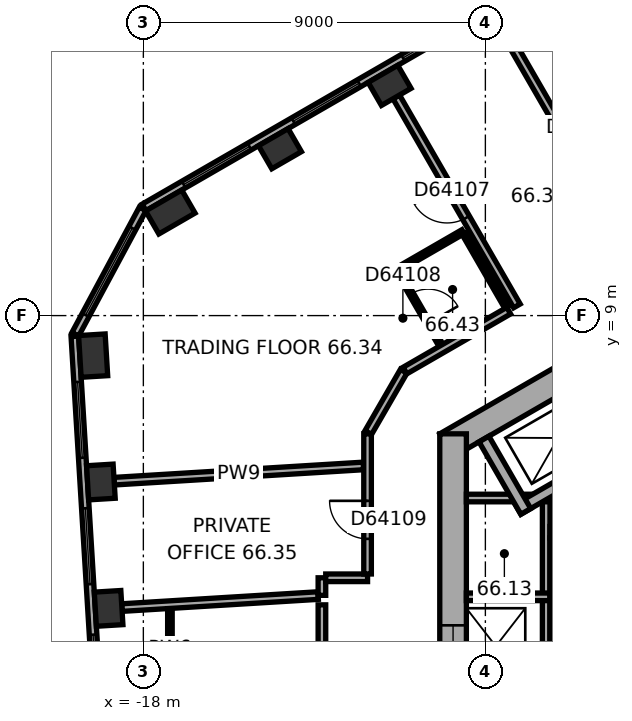
"""IFC4 building model, lengths in metres.
Left out: names, types, materials, properties, quantities, classifications, styles, units other than length and angle.
Written with IfcOpenShell. Run it as: python <this file> out.ifc"""

import sys

from ifc_helpers import new_model, si_unit, direction, frame, frame_2d, origin, origin_2d, place, context, subcontext, project, spatial, rectangle, extrude, element, fill, save


model = new_model("IFC4")
c1 = context("Model", 3, precision=1e-05, world=origin(), true_north=direction((0.0, 1.0)))
c2 = subcontext(c1, "Body", "Model", "MODEL_VIEW")
j1 = project(units=[si_unit("LENGTHUNIT", "METRE"), si_unit("PLANEANGLEUNIT", "RADIAN")], contexts=[c1])
p1 = place(None, origin())
s1 = spatial("IfcSite", under=j1, at=p1, CompositionType="ELEMENT")
p2 = place(p1, origin())
s2 = spatial("IfcBuilding", under=s1, at=p2, CompositionType="ELEMENT")
p3 = place(p2, frame((0.0, 0.0, 267.2)))
s3 = spatial("IfcBuildingStorey", under=s2, at=p3, CompositionType="ELEMENT", Elevation=267.2)
for number, where, z_axis, x_axis in (
    (1, (-11.52, 15.057, 0.0), (0.0, 0.0, 1.0), (-0.866, -0.5, 0.0)),
    (2, (-14.406, 13.391, 0.0), (0.0, 0.0, 1.0), (-0.866, -0.5, 0.0)),
):
    element("IfcColumn", number, at=place(p3, frame(where, z_axis=z_axis, x_axis=x_axis)), inside=s3, PredefinedType="COLUMN", context=c2, shape_type="SweptSolid", body=[
        extrude(rectangle(XDim=0.9, YDim=0.7, at=origin_2d()), origin(), (0.0, 0.0, 1.0), 3.7),
    ])
for number, where, z_axis, x_axis in (
    (3, (-17.291, 11.726, 0.0), (0.0, 0.0, 1.0), (-0.866, -0.5, 0.0)),
    (4, (-19.321, 7.947, 0.0), (0.0, 0.0, 1.0), (0.061, -0.998, 0.0)),
):
    element("IfcColumn", number, at=place(p3, frame(where, z_axis=z_axis, x_axis=x_axis)), inside=s3, PredefinedType="COLUMN", context=c2, shape_type="SweptSolid", body=[
        extrude(rectangle(XDim=1.1, YDim=0.7, at=origin_2d()), origin(), (0.0, 0.0, 1.0), 3.7),
    ])
for number, where, z_axis, x_axis in (
    (5, (-19.118, 4.621, 0.0), (0.0, 0.0, 1.0), (0.061, -0.998, 0.0)),
    (6, (-18.914, 1.296, 0.0), (0.0, 0.0, 1.0), (0.061, -0.998, 0.0)),
):
    element("IfcColumn", number, at=place(p3, frame(where, z_axis=z_axis, x_axis=x_axis)), inside=s3, PredefinedType="COLUMN", context=c2, shape_type="SweptSolid", body=[
        extrude(rectangle(XDim=0.9, YDim=0.7, at=origin_2d()), origin(), (0.0, 0.0, 1.0), 3.7),
    ])
p4 = place(p3, frame((0.175, 11.475, 0.0), z_axis=(0.0, 0.0, 1.0), x_axis=(-0.866026453023, -0.499998182661, 0.0)))
e7 = element("IfcWall", 7, at=p4, inside=s3, PredefinedType="SHEAR", context=c2, shape_type="SweptSolid", body=[
    extrude(rectangle(XDim=11.778, YDim=0.7, at=frame_2d((5.889, 0.0))), origin(), (0.0, 0.0, 1.0), 3.7),
])
p5 = place(p4, frame((6.089, 0.0, 0.0)))
e8 = element("IfcOpeningElement", 8, at=p5, cuts=e7, PredefinedType="OPENING", context=c2, shape_type="SweptSolid", body=[
    extrude(rectangle(XDim=1.5, YDim=2.1, at=frame_2d((0.75, 1.05))), frame((0.0, 0.36, 0.0), z_axis=(0.0, -1.0, 0.0), x_axis=(1.0, 0.0, 0.0)), (0.0, 0.0, 1.0), 0.72),
])
p6 = place(p4, frame((2.939, 0.0, 0.0)))
e9 = element("IfcOpeningElement", 9, at=p6, cuts=e7, PredefinedType="OPENING", context=c2, shape_type="SweptSolid", body=[
    extrude(rectangle(XDim=0.9, YDim=2.1, at=frame_2d((0.45, 1.05))), frame((0.0, 0.36, 0.0), z_axis=(0.0, -1.0, 0.0), x_axis=(1.0, 0.0, 0.0)), (0.0, 0.0, 1.0), 0.72),
])
p7 = place(p3, frame((-9.85, 5.889, 0.0), z_axis=(0.0, 0.0, 1.0), x_axis=(0.0, -1.0, 0.0)))
e10 = element("IfcWall", 10, at=p7, inside=s3, PredefinedType="SHEAR", context=c2, shape_type="SweptSolid", body=[
    extrude(rectangle(XDim=11.778, YDim=0.7, at=frame_2d((5.889, 0.0))), origin(), (0.0, 0.0, 1.0), 3.7),
])
p8 = place(p7, frame((5.039, 0.0, 0.0)))
e11 = element("IfcOpeningElement", 11, at=p8, cuts=e10, PredefinedType="OPENING", context=c2, shape_type="SweptSolid", body=[
    extrude(rectangle(XDim=1.1, YDim=2.1, at=frame_2d((0.55, 1.05))), frame((0.0, 0.36, 0.0), z_axis=(0.0, -1.0, 0.0), x_axis=(1.0, 0.0, 0.0)), (0.0, 0.0, 1.0), 0.72),
])
p9 = place(p7, frame((7.639, 0.0, 0.0)))
e12 = element("IfcOpeningElement", 12, at=p9, cuts=e10, PredefinedType="OPENING", context=c2, shape_type="SweptSolid", body=[
    extrude(rectangle(XDim=1.1, YDim=2.1, at=frame_2d((0.55, 1.05))), frame((0.0, 0.36, 0.0), z_axis=(0.0, -1.0, 0.0), x_axis=(1.0, 0.0, 0.0)), (0.0, 0.0, 1.0), 0.72),
])
p10 = place(p3, frame((-2.624, 20.713, 0.0), z_axis=(0.0, 0.0, 1.0), x_axis=(-0.866026460444, -0.499998169808, 0.0)))
e13 = element("IfcWall", 13, at=p10, inside=s3, PredefinedType="STANDARD", context=c2, shape_type="SweptSolid", body=[
    extrude(rectangle(XDim=17.731, YDim=0.2, at=frame_2d((8.866, 0.0))), origin(), (0.0, 0.0, 1.0), 3.7),
])
p11 = place(p10, frame((1.203, 0.0, 0.9)))
e14 = element("IfcOpeningElement", 14, at=p11, cuts=e13, PredefinedType="OPENING", context=c2, shape_type="SweptSolid", body=[
    extrude(rectangle(XDim=2.0, YDim=2.0, at=frame_2d((1.0, 1.0))), frame((0.0, 0.11, 0.0), z_axis=(0.0, -1.0, 0.0), x_axis=(1.0, 0.0, 0.0)), (0.0, 0.0, 1.0), 0.22),
])
p12 = place(p10, frame((4.535, 0.0, 0.9)))
e15 = element("IfcOpeningElement", 15, at=p12, cuts=e13, PredefinedType="OPENING", context=c2, shape_type="SweptSolid", body=[
    extrude(rectangle(XDim=2.0, YDim=2.0, at=frame_2d((1.0, 1.0))), frame((0.0, 0.11, 0.0), z_axis=(0.0, -1.0, 0.0), x_axis=(1.0, 0.0, 0.0)), (0.0, 0.0, 1.0), 0.22),
])
p13 = place(p10, frame((7.867, 0.0, 0.9)))
e16 = element("IfcOpeningElement", 16, at=p13, cuts=e13, PredefinedType="OPENING", context=c2, shape_type="SweptSolid", body=[
    extrude(rectangle(XDim=2.0, YDim=2.0, at=frame_2d((1.0, 1.0))), frame((0.0, 0.11, 0.0), z_axis=(0.0, -1.0, 0.0), x_axis=(1.0, 0.0, 0.0)), (0.0, 0.0, 1.0), 0.22),
])
p14 = place(p10, frame((11.198, 0.0, 0.9)))
e17 = element("IfcOpeningElement", 17, at=p14, cuts=e13, PredefinedType="OPENING", context=c2, shape_type="SweptSolid", body=[
    extrude(rectangle(XDim=2.0, YDim=2.0, at=frame_2d((1.0, 1.0))), frame((0.0, 0.11, 0.0), z_axis=(0.0, -1.0, 0.0), x_axis=(1.0, 0.0, 0.0)), (0.0, 0.0, 1.0), 0.22),
])
p15 = place(p10, frame((14.53, 0.0, 0.9)))
e18 = element("IfcOpeningElement", 18, at=p15, cuts=e13, PredefinedType="OPENING", context=c2, shape_type="SweptSolid", body=[
    extrude(rectangle(XDim=2.0, YDim=2.0, at=frame_2d((1.0, 1.0))), frame((0.0, 0.11, 0.0), z_axis=(0.0, -1.0, 0.0), x_axis=(1.0, 0.0, 0.0)), (0.0, 0.0, 1.0), 0.22),
])
p16 = place(p3, frame((-18.018, 11.808, 0.0), z_axis=(0.0, 0.0, 1.0), x_axis=(-0.473318619185, -0.880891301315, 0.0)))
e19 = element("IfcWall", 19, at=p16, inside=s3, PredefinedType="STANDARD", context=c2, shape_type="SweptSolid", body=[
    extrude(rectangle(XDim=3.747, YDim=0.2, at=frame_2d((1.874, 0.0))), origin(), (0.0, 0.0, 1.0), 3.7),
])
p17 = place(p16, frame((0.573, 0.0, 0.9)))
e20 = element("IfcOpeningElement", 20, at=p17, cuts=e19, PredefinedType="OPENING", context=c2, shape_type="SweptSolid", body=[
    extrude(rectangle(XDim=2.6, YDim=2.0, at=frame_2d((1.3, 1.0))), frame((0.0, 0.11, 0.0), z_axis=(0.0, -1.0, 0.0), x_axis=(1.0, 0.0, 0.0)), (0.0, 0.0, 1.0), 0.22),
])
p18 = place(p3, frame((-19.803, 8.454, 0.0), z_axis=(0.0, 0.0, 1.0), x_axis=(0.061036717565, -0.998135521414, 0.0)))
e21 = element("IfcWall", 21, at=p18, inside=s3, PredefinedType="STANDARD", context=c2, shape_type="SweptSolid", body=[
    extrude(rectangle(XDim=17.731, YDim=0.2, at=frame_2d((8.866, 0.0))), origin(), (0.0, 0.0, 1.0), 3.7),
])
p19 = place(p18, frame((1.202, 0.0, 0.9)))
e22 = element("IfcOpeningElement", 22, at=p19, cuts=e21, PredefinedType="OPENING", context=c2, shape_type="SweptSolid", body=[
    extrude(rectangle(XDim=2.0, YDim=2.0, at=frame_2d((1.0, 1.0))), frame((0.0, 0.11, 0.0), z_axis=(0.0, -1.0, 0.0), x_axis=(1.0, 0.0, 0.0)), (0.0, 0.0, 1.0), 0.22),
])
p20 = place(p18, frame((4.533, 0.0, 0.9)))
e23 = element("IfcOpeningElement", 23, at=p20, cuts=e21, PredefinedType="OPENING", context=c2, shape_type="SweptSolid", body=[
    extrude(rectangle(XDim=2.0, YDim=2.0, at=frame_2d((1.0, 1.0))), frame((0.0, 0.11, 0.0), z_axis=(0.0, -1.0, 0.0), x_axis=(1.0, 0.0, 0.0)), (0.0, 0.0, 1.0), 0.22),
])
p21 = place(p18, frame((7.865, 0.0, 0.9)))
e24 = element("IfcOpeningElement", 24, at=p21, cuts=e21, PredefinedType="OPENING", context=c2, shape_type="SweptSolid", body=[
    extrude(rectangle(XDim=2.0, YDim=2.0, at=frame_2d((1.0, 1.0))), frame((0.0, 0.11, 0.0), z_axis=(0.0, -1.0, 0.0), x_axis=(1.0, 0.0, 0.0)), (0.0, 0.0, 1.0), 0.22),
])
p22 = place(p18, frame((11.197, 0.0, 0.9)))
e25 = element("IfcOpeningElement", 25, at=p22, cuts=e21, PredefinedType="OPENING", context=c2, shape_type="SweptSolid", body=[
    extrude(rectangle(XDim=2.0, YDim=2.0, at=frame_2d((1.0, 1.0))), frame((0.0, 0.11, 0.0), z_axis=(0.0, -1.0, 0.0), x_axis=(1.0, 0.0, 0.0)), (0.0, 0.0, 1.0), 0.22),
])
p23 = place(p18, frame((14.528, 0.0, 0.9)))
e26 = element("IfcOpeningElement", 26, at=p23, cuts=e21, PredefinedType="OPENING", context=c2, shape_type="SweptSolid", body=[
    extrude(rectangle(XDim=2.0, YDim=2.0, at=frame_2d((1.0, 1.0))), frame((0.0, 0.11, 0.0), z_axis=(0.0, -1.0, 0.0), x_axis=(1.0, 0.0, 0.0)), (0.0, 0.0, 1.0), 0.22),
])
p24 = place(p3, frame((-7.4, 4.3, 0.0), z_axis=(0.0, 0.0, 1.0), x_axis=(0.0, -1.0, 0.0)))
e27 = element("IfcWall", 27, at=p24, inside=s3, PredefinedType="PARTITIONING", context=c2, shape_type="SweptSolid", body=[
    extrude(rectangle(XDim=8.0, YDim=0.2, at=frame_2d((4.0, 0.0))), origin(), (0.0, 0.0, 1.0), 3.42),
])
for number, where, z_axis, x_axis in (
    (28, (-7.3, 4.2, 0.0), (0.0, 0.0, 1.0), (-1.0, 0.0, 0.0)),
    (29, (-7.3, 1.6, 0.0), (0.0, 0.0, 1.0), (-1.0, 0.0, 0.0)),
):
    element("IfcWall", number, at=place(p3, frame(where, z_axis=z_axis, x_axis=x_axis)), inside=s3, PredefinedType="PARTITIONING", context=c2, shape_type="SweptSolid", body=[
        extrude(rectangle(XDim=2.2, YDim=0.2, at=frame_2d((1.1, 0.0))), origin(), (0.0, 0.0, 1.0), 3.42),
    ])
p25 = place(p3, frame((-2.6, 3.3, 0.0), z_axis=(0.0, 0.0, 1.0), x_axis=(-1.0, 0.0, 0.0)))
e30 = element("IfcWall", 30, at=p25, inside=s3, PredefinedType="SHEAR", context=c2, shape_type="SweptSolid", body=[
    extrude(rectangle(XDim=4.7, YDim=0.3, at=frame_2d((2.35, 0.0))), origin(), (0.0, 0.0, 1.0), 3.42),
])
p26 = place(p25, frame((0.8, 0.0, 0.0)))
e31 = element("IfcOpeningElement", 31, at=p26, cuts=e30, PredefinedType="OPENING", context=c2, shape_type="SweptSolid", body=[
    extrude(rectangle(XDim=1.2, YDim=2.1, at=frame_2d((0.6, 1.05))), frame((0.0, 0.16, 0.0), z_axis=(0.0, -1.0, 0.0), x_axis=(1.0, 0.0, 0.0)), (0.0, 0.0, 1.0), 0.32),
])
p27 = place(p3, frame((-7.15, 3.15, 0.0), z_axis=(0.0, 0.0, 1.0), x_axis=(0.0, -1.0, 0.0)))
e32 = element("IfcWall", 32, at=p27, inside=s3, PredefinedType="SHEAR", context=c2, shape_type="SweptSolid", body=[
    extrude(rectangle(XDim=7.06, YDim=0.3, at=frame_2d((3.53, 0.0))), origin(), (0.0, 0.0, 1.0), 3.42),
])
p28 = place(p3, frame((-5.24, 5.577, 0.0), z_axis=(0.0, 0.0, 1.0), x_axis=(-0.866014461049, -0.500018952895, 0.0)))
e33 = element("IfcWall", 33, at=p28, inside=s3, PredefinedType="SHEAR", context=c2, shape_type="SweptSolid", body=[
    extrude(rectangle(XDim=3.35, YDim=0.3, at=frame_2d((1.675, 0.0))), origin(), (0.0, 0.0, 1.0), 3.42),
])
p29 = place(p3, frame((-7.937, 3.847, 0.0), z_axis=(0.0, 0.0, 1.0), x_axis=(-0.50002983664, 0.866008176907, 0.0)))
e34 = element("IfcWall", 34, at=p29, inside=s3, PredefinedType="SHEAR", context=c2, shape_type="SweptSolid", body=[
    extrude(rectangle(XDim=2.2, YDim=0.3, at=frame_2d((1.1, 0.0))), origin(), (0.0, 0.0, 1.0), 3.42),
])
p30 = place(p3, frame((-18.768, 4.643, 0.0), z_axis=(0.0, 0.0, 1.0), x_axis=(0.99813496285, 0.0610458511, 0.0)))
e35 = element("IfcWall", 35, at=p30, inside=s3, PredefinedType="PARTITIONING", context=c2, shape_type="SweptSolid", body=[
    extrude(rectangle(XDim=6.571, YDim=0.2, at=frame_2d((3.285, 0.0))), origin(), (0.0, 0.0, 1.0), 3.42),
])
p31 = place(p3, frame((-18.565, 1.317, 0.0), z_axis=(0.0, 0.0, 1.0), x_axis=(0.998136844425, 0.061015078472, 0.0)))
e36 = element("IfcWall", 36, at=p31, inside=s3, PredefinedType="PARTITIONING", context=c2, shape_type="SweptSolid", body=[
    extrude(rectangle(XDim=5.174, YDim=0.2, at=frame_2d((2.587, 0.0))), origin(), (0.0, 0.0, 1.0), 2.87),
])
p32 = place(p3, frame((-17.301, -3.011, 0.0), z_axis=(0.0, 0.0, 1.0), x_axis=(0.0, 1.0, 0.0)))
e37 = element("IfcWall", 37, at=p32, inside=s3, PredefinedType="PARTITIONING", context=c2, shape_type="SweptSolid", body=[
    extrude(rectangle(XDim=4.3, YDim=0.12, at=frame_2d((2.15, 0.0))), origin(), (0.0, 0.0, 1.0), 3.42),
])
p33 = place(p32, frame((1.7, 0.0, 0.0)))
e38 = element("IfcOpeningElement", 38, at=p33, cuts=e37, PredefinedType="OPENING", context=c2, shape_type="SweptSolid", body=[
    extrude(rectangle(XDim=0.9, YDim=2.1, at=frame_2d((0.45, 1.05))), frame((0.0, 0.07, 0.0), z_axis=(0.0, -1.0, 0.0), x_axis=(1.0, 0.0, 0.0)), (0.0, 0.0, 1.0), 0.14),
])
p34 = place(p3, frame((-13.301, 1.389, 0.0), z_axis=(0.0, 0.0, 1.0), x_axis=(0.0, -1.0, 0.0)))
e39 = element("IfcWall", 39, at=p34, inside=s3, PredefinedType="PARTITIONING", context=c2, shape_type="SweptSolid", body=[
    extrude(rectangle(XDim=5.39, YDim=0.2, at=frame_2d((2.695, 0.0))), origin(), (0.0, 0.0, 1.0), 3.42),
])
p35 = place(p3, frame((-13.301, 2.101, 0.0), z_axis=(0.0, 0.0, 1.0), x_axis=(0.0, -1.0, 0.0)))
e40 = element("IfcWall", 40, at=p35, inside=s3, PredefinedType="PARTITIONING", context=c2, shape_type="SweptSolid", body=[
    extrude(rectangle(XDim=0.462, YDim=0.2, at=frame_2d((0.231, 0.0))), origin(), (0.0, 0.0, 1.0), 3.42),
])
p36 = place(p3, frame((-12.1, 2.101, 0.0), z_axis=(0.0, 0.0, 1.0), x_axis=(-1.0, 0.0, 0.0)))
e41 = element("IfcWall", 41, at=p36, inside=s3, PredefinedType="PARTITIONING", context=c2, shape_type="SweptSolid", body=[
    extrude(rectangle(XDim=1.101, YDim=0.2, at=frame_2d((0.55, 0.0))), origin(), (0.0, 0.0, 1.0), 3.42),
])
p37 = place(p3, frame((-12.1, 5.889, 0.0), z_axis=(0.0, 0.0, 1.0), x_axis=(0.0, -1.0, 0.0)))
e42 = element("IfcWall", 42, at=p37, inside=s3, PredefinedType="PARTITIONING", context=c2, shape_type="SweptSolid", body=[
    extrude(rectangle(XDim=3.688, YDim=0.2, at=frame_2d((1.844, 0.0))), origin(), (0.0, 0.0, 1.0), 3.42),
])
p38 = place(p37, frame((1.763, 0.0, 0.0)))
e43 = element("IfcOpeningElement", 43, at=p38, cuts=e42, PredefinedType="OPENING", context=c2, shape_type="SweptSolid", body=[
    extrude(rectangle(XDim=1.0, YDim=2.1, at=frame_2d((0.5, 1.05))), frame((0.0, 0.11, 0.0), z_axis=(0.0, -1.0, 0.0), x_axis=(1.0, 0.0, 0.0)), (0.0, 0.0, 1.0), 0.22),
])
p39 = place(p3, frame((-11.345, 14.754, 0.0), z_axis=(0.0, 0.0, 1.0), x_axis=(0.500005339912, -0.866022320763, 0.0)))
e44 = element("IfcWall", 44, at=p39, inside=s3, PredefinedType="PARTITIONING", context=c2, shape_type="SweptSolid", body=[
    extrude(rectangle(XDim=6.35, YDim=0.2, at=frame_2d((3.175, 0.0))), origin(), (0.0, 0.0, 1.0), 3.42),
])
p40 = place(p39, frame((2.675, 0.0, 0.0)))
e45 = element("IfcOpeningElement", 45, at=p40, cuts=e44, PredefinedType="OPENING", context=c2, shape_type="SweptSolid", body=[
    extrude(rectangle(XDim=1.0, YDim=2.1, at=frame_2d((0.5, 1.05))), frame((0.0, 0.11, 0.0), z_axis=(0.0, -1.0, 0.0), x_axis=(1.0, 0.0, 0.0)), (0.0, 0.0, 1.0), 0.22),
])
p41 = place(p3, frame((-11.319, 10.208, 0.0), z_axis=(0.0, 0.0, 1.0), x_axis=(0.866010750942, 0.50002537861, 0.0)))
e46 = element("IfcWall", 46, at=p41, inside=s3, PredefinedType="PARTITIONING", context=c2, shape_type="SweptSolid", body=[
    extrude(rectangle(XDim=2.0, YDim=0.12, at=frame_2d((1.0, 0.0))), origin(), (0.0, 0.0, 1.0), 3.42),
])
p42 = place(p3, frame((-11.15, 7.534, 0.0), z_axis=(0.0, 0.0, 1.0), x_axis=(-0.500063286585, -0.865988862174, 0.0)))
e47 = element("IfcWall", 47, at=p42, inside=s3, PredefinedType="PARTITIONING", context=c2, shape_type="SweptSolid", body=[
    extrude(rectangle(XDim=1.86, YDim=0.2, at=frame_2d((0.93, 0.0))), origin(), (0.0, 0.0, 1.0), 3.42),
])
p43 = place(p3, frame((-10.169, 8.216, 0.0), z_axis=(0.0, 0.0, 1.0), x_axis=(-0.500030632641, 0.866007717299, 0.0)))
e48 = element("IfcWall", 48, at=p43, inside=s3, PredefinedType="PARTITIONING", context=c2, shape_type="SweptSolid", body=[
    extrude(rectangle(XDim=2.24, YDim=0.12, at=frame_2d((1.12, 0.0))), origin(), (0.0, 0.0, 1.0), 3.42),
])
p44 = place(p43, frame((0.67, 0.0, 0.0)))
e49 = element("IfcOpeningElement", 49, at=p44, cuts=e48, PredefinedType="OPENING", context=c2, shape_type="SweptSolid", body=[
    extrude(rectangle(XDim=0.9, YDim=2.1, at=frame_2d((0.45, 1.05))), frame((0.0, 0.07, 0.0), z_axis=(0.0, -1.0, 0.0), x_axis=(1.0, 0.0, 0.0)), (0.0, 0.0, 1.0), 0.14),
])
p45 = place(p3, frame((-9.557, 11.156, 0.0), z_axis=(0.0, 0.0, 1.0), x_axis=(0.49994888933, -0.866054910533, 0.0)))
e50 = element("IfcWall", 50, at=p45, inside=s3, PredefinedType="PARTITIONING", context=c2, shape_type="SweptSolid", body=[
    extrude(rectangle(XDim=2.24, YDim=0.12, at=frame_2d((1.12, 0.0))), origin(), (0.0, 0.0, 1.0), 3.42),
])
p46 = place(p3, frame((-8.46, 16.42, 0.0), z_axis=(0.0, 0.0, 1.0), x_axis=(0.500005339912, -0.866022320763, 0.0)))
e51 = element("IfcWall", 51, at=p46, inside=s3, PredefinedType="PARTITIONING", context=c2, shape_type="SweptSolid", body=[
    extrude(rectangle(XDim=6.35, YDim=0.2, at=frame_2d((3.175, 0.0))), origin(), (0.0, 0.0, 1.0), 2.87),
])
p47 = place(p46, frame((2.675, 0.0, 0.0)))
e52 = element("IfcOpeningElement", 52, at=p47, cuts=e51, PredefinedType="OPENING", context=c2, shape_type="SweptSolid", body=[
    extrude(rectangle(XDim=1.0, YDim=2.1, at=frame_2d((0.5, 1.05))), frame((0.0, 0.11, 0.0), z_axis=(0.0, -1.0, 0.0), x_axis=(1.0, 0.0, 0.0)), (0.0, 0.0, 1.0), 0.22),
])
p48 = place(p3, frame((-8.387, 9.13, 0.0), z_axis=(0.0, 0.0, 1.0), x_axis=(-0.866026878644, -0.499997445459, 0.0)))
e53 = element("IfcWall", 53, at=p48, inside=s3, PredefinedType="PARTITIONING", context=c2, shape_type="SweptSolid", body=[
    extrude(rectangle(XDim=3.151, YDim=0.2, at=frame_2d((1.575, 0.0))), origin(), (0.0, 0.0, 1.0), 3.42),
])
p49 = place(p13, origin())
e54 = element("IfcWindow", 54, at=p49, inside=s3, PartitioningType="SINGLE_PANEL", PredefinedType="WINDOW", context=c2, shape_type="SweptSolid", body=[
    extrude(rectangle(XDim=2.0, YDim=2.0, at=frame_2d((1.0, 1.0))), frame((0.0, 0.03, 0.0), z_axis=(0.0, -1.0, 0.0), x_axis=(1.0, 0.0, 0.0)), (0.0, 0.0, 1.0), 0.06),
])
fill(e16, e54)
p50 = place(p14, origin())
e55 = element("IfcWindow", 55, at=p50, inside=s3, PartitioningType="SINGLE_PANEL", PredefinedType="WINDOW", context=c2, shape_type="SweptSolid", body=[
    extrude(rectangle(XDim=2.0, YDim=2.0, at=frame_2d((1.0, 1.0))), frame((0.0, 0.03, 0.0), z_axis=(0.0, -1.0, 0.0), x_axis=(1.0, 0.0, 0.0)), (0.0, 0.0, 1.0), 0.06),
])
fill(e17, e55)
p51 = place(p15, origin())
e56 = element("IfcWindow", 56, at=p51, inside=s3, PartitioningType="SINGLE_PANEL", PredefinedType="WINDOW", context=c2, shape_type="SweptSolid", body=[
    extrude(rectangle(XDim=2.0, YDim=2.0, at=frame_2d((1.0, 1.0))), frame((0.0, 0.03, 0.0), z_axis=(0.0, -1.0, 0.0), x_axis=(1.0, 0.0, 0.0)), (0.0, 0.0, 1.0), 0.06),
])
fill(e18, e56)
p52 = place(p17, origin())
e57 = element("IfcWindow", 57, at=p52, inside=s3, PartitioningType="SINGLE_PANEL", PredefinedType="WINDOW", context=c2, shape_type="SweptSolid", body=[
    extrude(rectangle(XDim=2.6, YDim=2.0, at=frame_2d((1.3, 1.0))), frame((0.0, 0.03, 0.0), z_axis=(0.0, -1.0, 0.0), x_axis=(1.0, 0.0, 0.0)), (0.0, 0.0, 1.0), 0.06),
])
fill(e20, e57)
p53 = place(p19, origin())
e58 = element("IfcWindow", 58, at=p53, inside=s3, PartitioningType="SINGLE_PANEL", PredefinedType="WINDOW", context=c2, shape_type="SweptSolid", body=[
    extrude(rectangle(XDim=2.0, YDim=2.0, at=frame_2d((1.0, 1.0))), frame((0.0, 0.03, 0.0), z_axis=(0.0, -1.0, 0.0), x_axis=(1.0, 0.0, 0.0)), (0.0, 0.0, 1.0), 0.06),
])
fill(e22, e58)
p54 = place(p20, origin())
e59 = element("IfcWindow", 59, at=p54, inside=s3, PartitioningType="SINGLE_PANEL", PredefinedType="WINDOW", context=c2, shape_type="SweptSolid", body=[
    extrude(rectangle(XDim=2.0, YDim=2.0, at=frame_2d((1.0, 1.0))), frame((0.0, 0.03, 0.0), z_axis=(0.0, -1.0, 0.0), x_axis=(1.0, 0.0, 0.0)), (0.0, 0.0, 1.0), 0.06),
])
fill(e23, e59)
p55 = place(p21, origin())
e60 = element("IfcWindow", 60, at=p55, inside=s3, PartitioningType="SINGLE_PANEL", PredefinedType="WINDOW", context=c2, shape_type="SweptSolid", body=[
    extrude(rectangle(XDim=2.0, YDim=2.0, at=frame_2d((1.0, 1.0))), frame((0.0, 0.03, 0.0), z_axis=(0.0, -1.0, 0.0), x_axis=(1.0, 0.0, 0.0)), (0.0, 0.0, 1.0), 0.06),
])
fill(e24, e60)
p56 = place(p8, origin())
e61 = element("IfcDoor", 61, at=p56, inside=s3, OperationType="DOUBLE_DOOR_SLIDING", PredefinedType="DOOR", context=c2, shape_type="SweptSolid", body=[
    extrude(rectangle(XDim=1.1, YDim=2.1, at=frame_2d((0.55, 1.05))), frame((0.0, 0.025, 0.0), z_axis=(0.0, -1.0, 0.0), x_axis=(1.0, 0.0, 0.0)), (0.0, 0.0, 1.0), 0.05),
])
fill(e11, e61)
p57 = place(p40, origin())
e62 = element("IfcDoor", 62, at=p57, inside=s3, OperationType="SINGLE_SWING_LEFT", PredefinedType="DOOR", context=c2, shape_type="SweptSolid", body=[
    extrude(rectangle(XDim=1.0, YDim=2.1, at=frame_2d((0.5, 1.05))), frame((0.0, 0.025, 0.0), z_axis=(0.0, -1.0, 0.0), x_axis=(1.0, 0.0, 0.0)), (0.0, 0.0, 1.0), 0.05),
])
fill(e45, e62)
p58 = place(p44, origin())
e63 = element("IfcDoor", 63, at=p58, inside=s3, OperationType="SINGLE_SWING_LEFT", PredefinedType="DOOR", context=c2, shape_type="SweptSolid", body=[
    extrude(rectangle(XDim=0.9, YDim=2.1, at=frame_2d((0.45, 1.05))), frame((0.0, 0.025, 0.0), z_axis=(0.0, -1.0, 0.0), x_axis=(1.0, 0.0, 0.0)), (0.0, 0.0, 1.0), 0.05),
])
fill(e49, e63)
p59 = place(p38, origin())
e64 = element("IfcDoor", 64, at=p59, inside=s3, OperationType="SINGLE_SWING_LEFT", PredefinedType="DOOR", context=c2, shape_type="SweptSolid", body=[
    extrude(rectangle(XDim=1.0, YDim=2.1, at=frame_2d((0.5, 1.05))), frame((0.0, 0.025, 0.0), z_axis=(0.0, -1.0, 0.0), x_axis=(1.0, 0.0, 0.0)), (0.0, 0.0, 1.0), 0.05),
])
fill(e43, e64)
save(model, sys.argv[1])
